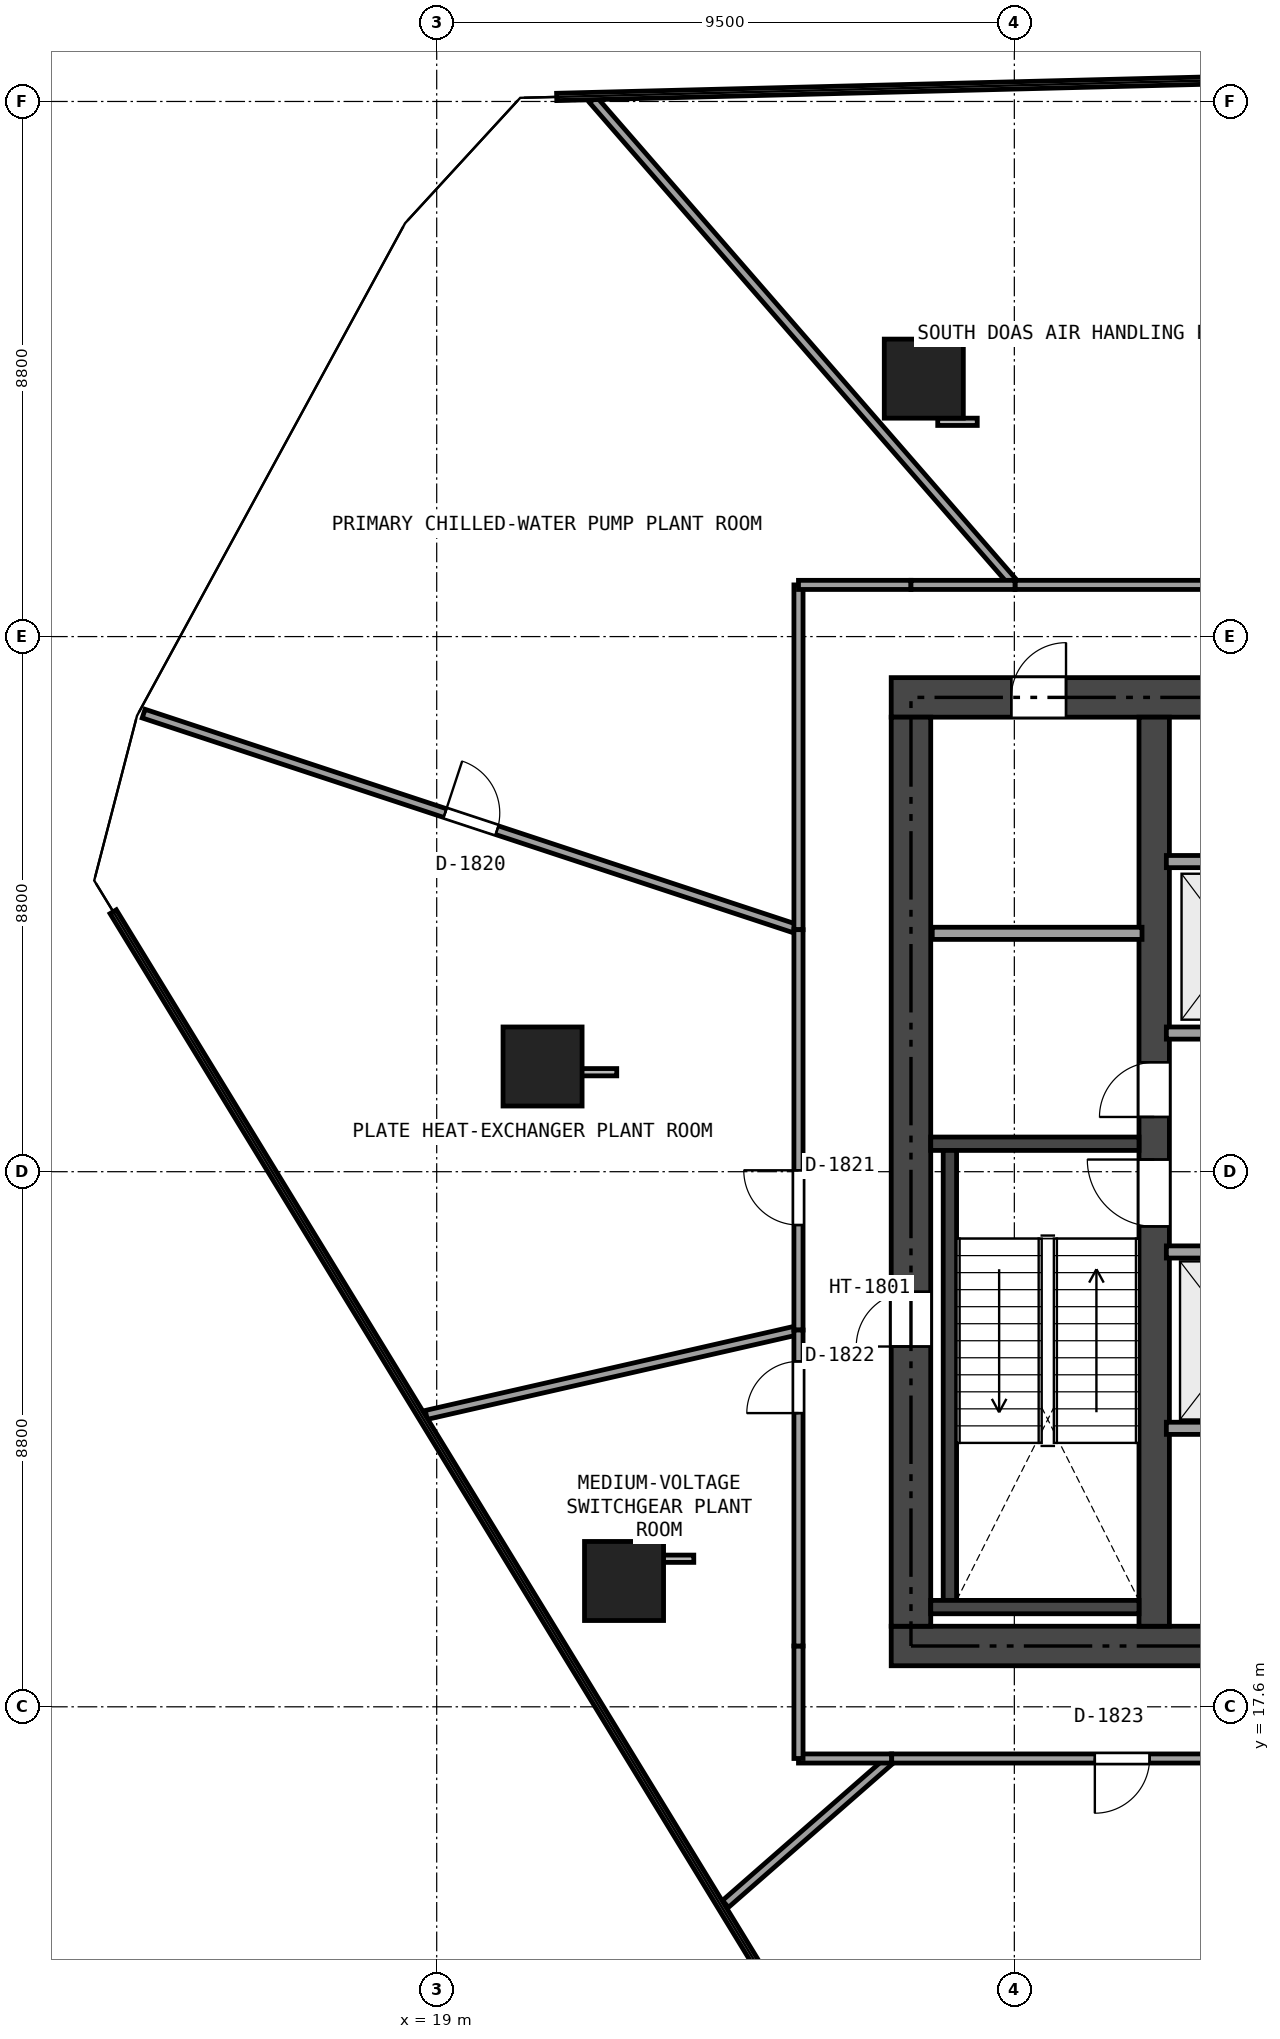
"""IFC4 building model, lengths in metres.
Left out: names, types, materials, properties, quantities, classifications, styles, units other than length and angle.
Written with IfcOpenShell. Run it as: python <this file> out.ifc"""

import sys

from ifc_helpers import new_model, si_unit, direction, frame, frame_2d, origin, origin_2d, place, context, subcontext, project, spatial, rectangle, extrude, element, fill, save


model = new_model("IFC4")
c1 = context("Model", 3, precision=1e-05, world=origin(), true_north=direction((0.0, 1.0)))
c2 = subcontext(c1, "Body", "Model", "MODEL_VIEW")
j1 = project(units=[si_unit("LENGTHUNIT", "METRE"), si_unit("PLANEANGLEUNIT", "RADIAN")], contexts=[c1])
p1 = place(None, origin())
s1 = spatial("IfcSite", under=j1, at=p1, CompositionType="ELEMENT")
p2 = place(p1, origin())
s2 = spatial("IfcBuilding", under=s1, at=p2, CompositionType="ELEMENT")
p3 = place(p2, frame((0.0, 0.0, 71.85)))
s3 = spatial("IfcBuildingStorey", under=s2, at=p3, CompositionType="ELEMENT", Elevation=71.85)
p4 = place(p3, frame((26.475, 18.6, 0.0), z_axis=(0.0, 0.0, 1.0), x_axis=(1.0, 0.0, 0.0)))
e1 = element("IfcWall", 1, at=p4, inside=s3, PredefinedType="SHEAR", context=c2, shape_type="SweptSolid", body=[
    extrude(rectangle(XDim=21.45, YDim=0.65, at=frame_2d((10.725, 0.0))), origin(), (0.0, 0.0, 1.0), 4.08),
])
p5 = place(p4, frame((12.45, 0.0, 0.0)))
e2 = element("IfcOpeningElement", 2, at=p5, cuts=e1, PredefinedType="OPENING", context=c2, shape_type="SweptSolid", body=[
    extrude(rectangle(XDim=1.15, YDim=2.15, at=frame_2d((0.575, 1.075))), frame((0.0, 0.335, 0.0), z_axis=(0.0, -1.0, 0.0), x_axis=(1.0, 0.0, 0.0)), (0.0, 0.0, 1.0), 0.67),
])
p6 = place(p4, frame((5.275, 0.0, 0.0)))
e3 = element("IfcOpeningElement", 3, at=p6, cuts=e1, PredefinedType="OPENING", context=c2, shape_type="SweptSolid", body=[
    extrude(rectangle(XDim=0.9, YDim=2.1, at=frame_2d((0.45, 1.05))), frame((0.0, 0.335, 0.0), z_axis=(0.0, -1.0, 0.0), x_axis=(1.0, 0.0, 0.0)), (0.0, 0.0, 1.0), 0.67),
])
p7 = place(p3, frame((26.475, 34.2, 0.0), z_axis=(0.0, 0.0, 1.0), x_axis=(1.0, 0.0, 0.0)))
e4 = element("IfcWall", 4, at=p7, inside=s3, PredefinedType="SHEAR", context=c2, shape_type="SweptSolid", body=[
    extrude(rectangle(XDim=21.45, YDim=0.65, at=frame_2d((10.725, 0.0))), origin(), (0.0, 0.0, 1.0), 4.08),
])
p8 = place(p7, frame((9.725, 0.0, 0.0)))
e5 = element("IfcOpeningElement", 5, at=p8, cuts=e4, PredefinedType="OPENING", context=c2, shape_type="SweptSolid", body=[
    extrude(rectangle(XDim=1.1, YDim=2.15, at=frame_2d((0.55, 1.075))), frame((0.0, 0.335, 0.0), z_axis=(0.0, -1.0, 0.0), x_axis=(1.0, 0.0, 0.0)), (0.0, 0.0, 1.0), 0.67),
])
p9 = place(p7, frame((1.975, 0.0, 0.0)))
e6 = element("IfcOpeningElement", 6, at=p9, cuts=e4, PredefinedType="OPENING", context=c2, shape_type="SweptSolid", body=[
    extrude(rectangle(XDim=0.9, YDim=2.1, at=frame_2d((0.45, 1.05))), frame((0.0, 0.335, 0.0), z_axis=(0.0, -1.0, 0.0), x_axis=(1.0, 0.0, 0.0)), (0.0, 0.0, 1.0), 0.67),
])
p10 = place(p7, frame((6.275, 0.0, 0.0)))
e7 = element("IfcOpeningElement", 7, at=p10, cuts=e4, PredefinedType="OPENING", context=c2, shape_type="SweptSolid", body=[
    extrude(rectangle(XDim=0.9, YDim=2.1, at=frame_2d((0.45, 1.05))), frame((0.0, 0.335, 0.0), z_axis=(0.0, -1.0, 0.0), x_axis=(1.0, 0.0, 0.0)), (0.0, 0.0, 1.0), 0.67),
])
p11 = place(p3, frame((26.8, 18.925, 0.0), z_axis=(0.0, 0.0, 1.0), x_axis=(0.0, 1.0, 0.0)))
e8 = element("IfcWall", 8, at=p11, inside=s3, PredefinedType="SHEAR", context=c2, shape_type="SweptSolid", body=[
    extrude(rectangle(XDim=14.95, YDim=0.65, at=frame_2d((7.475, 0.0))), origin(), (0.0, 0.0, 1.0), 4.08),
])
p12 = place(p11, frame((4.6, 0.0, 0.02)))
e9 = element("IfcOpeningElement", 9, at=p12, cuts=e8, PredefinedType="OPENING", context=c2, shape_type="SweptSolid", body=[
    extrude(rectangle(XDim=0.9, YDim=2.02, at=frame_2d((0.45, 1.01))), frame((0.0, 0.335, 0.0), z_axis=(0.0, -1.0, 0.0), x_axis=(1.0, 0.0, 0.0)), (0.0, 0.0, 1.0), 0.67),
])
p13 = place(p3, frame((30.8, 18.925, 0.0), z_axis=(0.0, 0.0, 1.0), x_axis=(0.0, 1.0, 0.0)))
e10 = element("IfcWall", 10, at=p13, inside=s3, PredefinedType="SHEAR", context=c2, shape_type="SweptSolid", body=[
    extrude(rectangle(XDim=14.95, YDim=0.5, at=frame_2d((7.475, 0.0))), origin(), (0.0, 0.0, 1.0), 4.08),
])
p14 = place(p13, frame((6.575, 0.0, 0.0)))
e11 = element("IfcOpeningElement", 11, at=p14, cuts=e10, PredefinedType="OPENING", context=c2, shape_type="SweptSolid", body=[
    extrude(rectangle(XDim=1.1, YDim=2.15, at=frame_2d((0.55, 1.075))), frame((0.0, 0.26, 0.0), z_axis=(0.0, -1.0, 0.0), x_axis=(1.0, 0.0, 0.0)), (0.0, 0.0, 1.0), 0.52),
])
p15 = place(p13, frame((8.375, 0.0, 0.0)))
e12 = element("IfcOpeningElement", 12, at=p15, cuts=e10, PredefinedType="OPENING", context=c2, shape_type="SweptSolid", body=[
    extrude(rectangle(XDim=0.9, YDim=2.1, at=frame_2d((0.45, 1.05))), frame((0.0, 0.26, 0.0), z_axis=(0.0, -1.0, 0.0), x_axis=(1.0, 0.0, 0.0)), (0.0, 0.0, 1.0), 0.52),
])
p16 = place(p3, frame((27.125, 26.86, 0.0), z_axis=(0.0, 0.0, 1.0), x_axis=(1.0, 0.0, 0.0)))
e13 = element("IfcWall", 13, at=p16, inside=s3, PredefinedType="SHEAR", context=c2, shape_type="SweptSolid", body=[
    extrude(rectangle(XDim=3.425, YDim=0.22, at=frame_2d((1.712, 0.0))), origin(), (0.0, 0.0, 1.0), 4.08),
])
p17 = place(p3, frame((27.44, 19.35, 0.0), z_axis=(0.0, 0.0, 1.0), x_axis=(0.0, 1.0, 0.0)))
e14 = element("IfcWall", 14, at=p17, inside=s3, PredefinedType="SHEAR", context=c2, shape_type="SweptSolid", body=[
    extrude(rectangle(XDim=7.4, YDim=0.22, at=frame_2d((3.7, 0.0))), origin(), (0.0, 0.0, 1.0), 4.08),
])
p18 = place(p3, frame((27.125, 19.24, 0.0), z_axis=(0.0, 0.0, 1.0), x_axis=(1.0, 0.0, 0.0)))
e15 = element("IfcWall", 15, at=p18, inside=s3, PredefinedType="SHEAR", context=c2, shape_type="SweptSolid", body=[
    extrude(rectangle(XDim=3.425, YDim=0.22, at=frame_2d((1.712, 0.0))), origin(), (0.0, 0.0, 1.0), 4.08),
])
for number, where, z_axis, x_axis in (
    (16, (27.011, 39.442, 0.0), (0.0, 0.0, 1.0), (1.0, 0.0, 0.0)),
    (17, (20.741, 28.13, 0.0), (0.0, 0.0, 1.0), (1.0, 0.0, 0.0)),
    (18, (22.081, 19.669, 0.0), (0.0, 0.0, 1.0), (1.0, 0.0, 0.0)),
):
    element("IfcColumn", number, at=place(p3, frame(where, z_axis=z_axis, x_axis=x_axis)), inside=s3, PredefinedType="COLUMN", context=c2, shape_type="SweptSolid", body=[
        extrude(rectangle(XDim=1.3, YDim=1.3, at=origin_2d()), origin(), (0.0, 0.0, 1.0), 4.08),
    ])
p19 = place(p3, frame((27.15, 30.32, 0.0), z_axis=(0.0, 0.0, 1.0), x_axis=(1.0, 0.0, 0.0)))
e19 = element("IfcWall", 19, at=p19, inside=s3, PredefinedType="SOLIDWALL", context=c2, shape_type="SweptSolid", body=[
    extrude(rectangle(XDim=3.45, YDim=0.2, at=frame_2d((1.725, 0.0))), origin(), (0.0, 0.0, 1.0), 4.08),
])
p20 = place(p3, frame((31.0, 28.68, 0.0), z_axis=(0.0, 0.0, 1.0), x_axis=(1.0, 0.0, 0.0)))
e20 = element("IfcWall", 20, at=p20, inside=s3, PredefinedType="SOLIDWALL", context=c2, shape_type="SweptSolid", body=[
    extrude(rectangle(XDim=4.42, YDim=0.2, at=frame_2d((2.21, 0.0))), origin(), (0.0, 0.0, 1.0), 4.08),
])
p21 = place(p20, frame((0.6, 0.0, 0.0)))
e21 = element("IfcOpeningElement", 21, at=p21, cuts=e20, PredefinedType="OPENING", context=c2, shape_type="SweptSolid", body=[
    extrude(rectangle(XDim=1.1, YDim=2.15, at=frame_2d((0.55, 1.075))), frame((0.0, 0.11, 0.0), z_axis=(0.0, -1.0, 0.0), x_axis=(1.0, 0.0, 0.0)), (0.0, 0.0, 1.0), 0.22),
])
p22 = place(p20, frame((2.85, 0.0, 0.0)))
e22 = element("IfcOpeningElement", 22, at=p22, cuts=e20, PredefinedType="OPENING", context=c2, shape_type="SweptSolid", body=[
    extrude(rectangle(XDim=1.1, YDim=2.15, at=frame_2d((0.55, 1.075))), frame((0.0, 0.11, 0.0), z_axis=(0.0, -1.0, 0.0), x_axis=(1.0, 0.0, 0.0)), (0.0, 0.0, 1.0), 0.22),
])
p23 = place(p3, frame((31.0, 31.5, 0.0), z_axis=(0.0, 0.0, 1.0), x_axis=(1.0, 0.0, 0.0)))
e23 = element("IfcWall", 23, at=p23, inside=s3, PredefinedType="SOLIDWALL", context=c2, shape_type="SweptSolid", body=[
    extrude(rectangle(XDim=4.42, YDim=0.2, at=frame_2d((2.21, 0.0))), origin(), (0.0, 0.0, 1.0), 4.08),
])
p24 = place(p3, frame((31.0, 25.08, 0.0), z_axis=(0.0, 0.0, 1.0), x_axis=(1.0, 0.0, 0.0)))
e24 = element("IfcWall", 24, at=p24, inside=s3, PredefinedType="SOLIDWALL", context=c2, shape_type="SweptSolid", body=[
    extrude(rectangle(XDim=4.42, YDim=0.2, at=frame_2d((2.21, 0.0))), origin(), (0.0, 0.0, 1.0), 4.08),
])
p25 = place(p24, frame((3.0, 0.0, 0.0)))
e25 = element("IfcOpeningElement", 25, at=p25, cuts=e24, PredefinedType="OPENING", context=c2, shape_type="SweptSolid", body=[
    extrude(rectangle(XDim=0.9, YDim=2.1, at=frame_2d((0.45, 1.05))), frame((0.0, 0.11, 0.0), z_axis=(0.0, -1.0, 0.0), x_axis=(1.0, 0.0, 0.0)), (0.0, 0.0, 1.0), 0.22),
])
p26 = place(p24, frame((0.62, 0.0, 0.0)))
e26 = element("IfcOpeningElement", 26, at=p26, cuts=e24, PredefinedType="OPENING", context=c2, shape_type="SweptSolid", body=[
    extrude(rectangle(XDim=1.2, YDim=2.15, at=frame_2d((0.6, 1.075))), frame((0.0, 0.11, 0.0), z_axis=(0.0, -1.0, 0.0), x_axis=(1.0, 0.0, 0.0)), (0.0, 0.0, 1.0), 0.22),
])
p27 = place(p3, frame((31.0, 22.18, 0.0), z_axis=(0.0, 0.0, 1.0), x_axis=(1.0, 0.0, 0.0)))
e27 = element("IfcWall", 27, at=p27, inside=s3, PredefinedType="SOLIDWALL", context=c2, shape_type="SweptSolid", body=[
    extrude(rectangle(XDim=2.42, YDim=0.2, at=frame_2d((1.21, 0.0))), origin(), (0.0, 0.0, 1.0), 4.08),
])
p28 = place(p3, frame((21.571, 44.029, 0.0), z_axis=(0.0, 0.0, 1.0), x_axis=(0.656269020125, -0.754526986412, 0.0)))
e28 = element("IfcWall", 28, at=p28, inside=s3, PredefinedType="PARTITIONING", context=c2, shape_type="SweptSolid", body=[
    extrude(rectangle(XDim=10.575, YDim=0.15, at=frame_2d((5.288, 0.0))), origin(), (0.0, 0.0, 1.0), 3.265),
])
p29 = place(p3, frame((28.511, 36.05, 0.0), z_axis=(0.0, 0.0, 1.0), x_axis=(1.0, 0.0, 0.0)))
e29 = element("IfcWall", 29, at=p29, inside=s3, PredefinedType="PARTITIONING", context=c2, shape_type="SweptSolid", body=[
    extrude(rectangle(XDim=6.638, YDim=0.15, at=frame_2d((3.319, 0.0))), origin(), (0.0, 0.0, 1.0), 3.065),
])
p30 = place(p29, frame((3.245, 0.0, 0.0)))
e30 = element("IfcOpeningElement", 30, at=p30, cuts=e29, PredefinedType="OPENING", context=c2, shape_type="SweptSolid", body=[
    extrude(rectangle(XDim=0.9, YDim=2.0, at=frame_2d((0.45, 1.0))), frame((0.0, 0.085, 0.0), z_axis=(0.0, -1.0, 0.0), x_axis=(1.0, 0.0, 0.0)), (0.0, 0.0, 1.0), 0.17),
])
p31 = place(p3, frame((14.18, 33.933, 0.0), z_axis=(0.0, 0.0, 1.0), x_axis=(0.949651837429, -0.313307177811, 0.0)))
e31 = element("IfcWall", 31, at=p31, inside=s3, PredefinedType="PARTITIONING", context=c2, shape_type="SweptSolid", body=[
    extrude(rectangle(XDim=11.341, YDim=0.15, at=frame_2d((5.67, 0.0))), origin(), (0.0, 0.0, 1.0), 3.265),
])
p32 = place(p31, frame((5.22, 0.0, 0.0)))
e32 = element("IfcOpeningElement", 32, at=p32, cuts=e31, PredefinedType="OPENING", context=c2, shape_type="SweptSolid", body=[
    extrude(rectangle(XDim=0.9, YDim=2.0, at=frame_2d((0.45, 1.0))), frame((0.0, 0.085, 0.0), z_axis=(0.0, -1.0, 0.0), x_axis=(1.0, 0.0, 0.0)), (0.0, 0.0, 1.0), 0.17),
])
p33 = place(p3, frame((24.95, 30.38, 0.0), z_axis=(0.0, 0.0, 1.0), x_axis=(0.0, 1.0, 0.0)))
e33 = element("IfcWall", 33, at=p33, inside=s3, PredefinedType="PARTITIONING", context=c2, shape_type="SweptSolid", body=[
    extrude(rectangle(XDim=5.67, YDim=0.15, at=frame_2d((2.835, 0.0))), origin(), (0.0, 0.0, 1.0), 3.265),
])
p34 = place(p3, frame((24.95, 36.05, 0.0), z_axis=(0.0, 0.0, 1.0), x_axis=(1.0, 0.0, 0.0)))
e34 = element("IfcWall", 34, at=p34, inside=s3, PredefinedType="PARTITIONING", context=c2, shape_type="SweptSolid", body=[
    extrude(rectangle(XDim=1.85, YDim=0.15, at=frame_2d((0.925, 0.0))), origin(), (0.0, 0.0, 1.0), 3.265),
])
p35 = place(p3, frame((26.8, 36.05, 0.0), z_axis=(0.0, 0.0, 1.0), x_axis=(1.0, 0.0, 0.0)))
e35 = element("IfcWall", 35, at=p35, inside=s3, PredefinedType="PARTITIONING", context=c2, shape_type="SweptSolid", body=[
    extrude(rectangle(XDim=1.711, YDim=0.15, at=frame_2d((0.855, 0.0))), origin(), (0.0, 0.0, 1.0), 4.08),
])
p36 = place(p3, frame((18.828, 22.4, 0.0), z_axis=(0.0, 0.0, 1.0), x_axis=(0.974973721183, 0.222320136295, 0.0)))
e36 = element("IfcWall", 36, at=p36, inside=s3, PredefinedType="PARTITIONING", context=c2, shape_type="SweptSolid", body=[
    extrude(rectangle(XDim=6.279, YDim=0.15, at=frame_2d((3.14, 0.0))), origin(), (0.0, 0.0, 1.0), 3.265),
])
p37 = place(p3, frame((24.95, 23.796, 0.0), z_axis=(0.0, 0.0, 1.0), x_axis=(0.0, 1.0, 0.0)))
e37 = element("IfcWall", 37, at=p37, inside=s3, PredefinedType="PARTITIONING", context=c2, shape_type="SweptSolid", body=[
    extrude(rectangle(XDim=6.584, YDim=0.15, at=frame_2d((3.292, 0.0))), origin(), (0.0, 0.0, 1.0), 3.065),
])
p38 = place(p37, frame((1.727, 0.0, 0.0)))
e38 = element("IfcOpeningElement", 38, at=p38, cuts=e37, PredefinedType="OPENING", context=c2, shape_type="SweptSolid", body=[
    extrude(rectangle(XDim=0.9, YDim=2.0, at=frame_2d((0.45, 1.0))), frame((0.0, 0.085, 0.0), z_axis=(0.0, -1.0, 0.0), x_axis=(1.0, 0.0, 0.0)), (0.0, 0.0, 1.0), 0.17),
])
p39 = place(p3, frame((23.749, 14.358, 0.0), z_axis=(0.0, 0.0, 1.0), x_axis=(0.752585021189, 0.658495091767, 0.0)))
e39 = element("IfcWall", 39, at=p39, inside=s3, PredefinedType="PARTITIONING", context=c2, shape_type="SweptSolid", body=[
    extrude(rectangle(XDim=3.633, YDim=0.15, at=frame_2d((1.816, 0.0))), origin(), (0.0, 0.0, 1.0), 3.265),
])
p40 = place(p3, frame((26.483, 16.75, 0.0), z_axis=(0.0, 0.0, 1.0), x_axis=(-1.0, 0.0, 0.0)))
e40 = element("IfcWall", 40, at=p40, inside=s3, PredefinedType="PARTITIONING", context=c2, shape_type="SweptSolid", body=[
    extrude(rectangle(XDim=1.533, YDim=0.15, at=frame_2d((0.767, 0.0))), origin(), (0.0, 0.0, 1.0), 3.265),
])
p41 = place(p3, frame((24.95, 16.75, 0.0), z_axis=(0.0, 0.0, 1.0), x_axis=(0.0, 1.0, 0.0)))
e41 = element("IfcWall", 41, at=p41, inside=s3, PredefinedType="PARTITIONING", context=c2, shape_type="SweptSolid", body=[
    extrude(rectangle(XDim=1.85, YDim=0.15, at=frame_2d((0.925, 0.0))), origin(), (0.0, 0.0, 1.0), 3.265),
])
p42 = place(p3, frame((24.95, 18.6, 0.0), z_axis=(0.0, 0.0, 1.0), x_axis=(0.0, 1.0, 0.0)))
e42 = element("IfcWall", 42, at=p42, inside=s3, PredefinedType="PARTITIONING", context=c2, shape_type="SweptSolid", body=[
    extrude(rectangle(XDim=5.196, YDim=0.15, at=frame_2d((2.598, 0.0))), origin(), (0.0, 0.0, 1.0), 3.065),
])
p43 = place(p42, frame((3.83, 0.0, 0.0)))
e43 = element("IfcOpeningElement", 43, at=p43, cuts=e42, PredefinedType="OPENING", context=c2, shape_type="SweptSolid", body=[
    extrude(rectangle(XDim=0.85, YDim=2.0, at=frame_2d((0.425, 1.0))), frame((0.0, 0.085, 0.0), z_axis=(0.0, -1.0, 0.0), x_axis=(1.0, 0.0, 0.0)), (0.0, 0.0, 1.0), 0.17),
])
p44 = place(p3, frame((29.845, 4.353, 0.0), z_axis=(0.0, 0.0, 1.0), x_axis=(0.322244958059, 0.946656319371, 0.0)))
e44 = element("IfcWall", 44, at=p44, inside=s3, PredefinedType="PARTITIONING", context=c2, shape_type="SweptSolid", body=[
    extrude(rectangle(XDim=13.095, YDim=0.15, at=frame_2d((6.548, 0.0))), origin(), (0.0, 0.0, 1.0), 3.065),
])
p45 = place(p3, frame((34.065, 16.75, 0.0), z_axis=(0.0, 0.0, 1.0), x_axis=(-1.0, 0.0, 0.0)))
e45 = element("IfcWall", 45, at=p45, inside=s3, PredefinedType="PARTITIONING", context=c2, shape_type="SweptSolid", body=[
    extrude(rectangle(XDim=7.582, YDim=0.15, at=frame_2d((3.791, 0.0))), origin(), (0.0, 0.0, 1.0), 3.065),
])
p46 = place(p45, frame((3.341, 0.0, 0.0)))
e46 = element("IfcOpeningElement", 46, at=p46, cuts=e45, PredefinedType="OPENING", context=c2, shape_type="SweptSolid", body=[
    extrude(rectangle(XDim=0.9, YDim=2.0, at=frame_2d((0.45, 1.0))), frame((0.0, 0.085, 0.0), z_axis=(0.0, -1.0, 0.0), x_axis=(1.0, 0.0, 0.0)), (0.0, 0.0, 1.0), 0.17),
])
p47 = place(p12, origin())
e47 = element("IfcDoor", 47, at=p47, inside=s3, OperationType="SINGLE_SWING_LEFT", PredefinedType="TRAPDOOR", context=c2, shape_type="SweptSolid", body=[
    extrude(rectangle(XDim=0.9, YDim=2.02, at=frame_2d((0.45, 1.01))), frame((0.0, 0.025, 0.0), z_axis=(0.0, -1.0, 0.0), x_axis=(1.0, 0.0, 0.0)), (0.0, 0.0, 1.0), 0.05),
])
fill(e9, e47)
p48 = place(p14, origin())
e48 = element("IfcDoor", 48, at=p48, inside=s3, OperationType="SINGLE_SWING_RIGHT", PredefinedType="DOOR", context=c2, shape_type="SweptSolid", body=[
    extrude(rectangle(XDim=1.1, YDim=2.15, at=frame_2d((0.55, 1.075))), frame((0.0, 0.025, 0.0), z_axis=(0.0, -1.0, 0.0), x_axis=(1.0, 0.0, 0.0)), (0.0, 0.0, 1.0), 0.05),
])
fill(e11, e48)
p49 = place(p15, origin())
e49 = element("IfcDoor", 49, at=p49, inside=s3, OperationType="SINGLE_SWING_LEFT", PredefinedType="DOOR", context=c2, shape_type="SweptSolid", body=[
    extrude(rectangle(XDim=0.9, YDim=2.1, at=frame_2d((0.45, 1.05))), frame((0.0, 0.025, 0.0), z_axis=(0.0, -1.0, 0.0), x_axis=(1.0, 0.0, 0.0)), (0.0, 0.0, 1.0), 0.05),
])
fill(e12, e49)
p50 = place(p9, origin())
e50 = element("IfcDoor", 50, at=p50, inside=s3, OperationType="SINGLE_SWING_RIGHT", PredefinedType="DOOR", context=c2, shape_type="SweptSolid", body=[
    extrude(rectangle(XDim=0.9, YDim=2.1, at=frame_2d((0.45, 1.05))), frame((0.0, 0.025, 0.0), z_axis=(0.0, -1.0, 0.0), x_axis=(1.0, 0.0, 0.0)), (0.0, 0.0, 1.0), 0.05),
])
fill(e6, e50)
p51 = place(p32, origin())
e51 = element("IfcDoor", 51, at=p51, inside=s3, OperationType="SINGLE_SWING_LEFT", PredefinedType="DOOR", context=c2, shape_type="SweptSolid", body=[
    extrude(rectangle(XDim=0.9, YDim=2.0, at=frame_2d((0.45, 1.0))), frame((0.0, 0.025, 0.0), z_axis=(0.0, -1.0, 0.0), x_axis=(1.0, 0.0, 0.0)), (0.0, 0.0, 1.0), 0.05),
])
fill(e32, e51)
p52 = place(p38, origin())
e52 = element("IfcDoor", 52, at=p52, inside=s3, OperationType="SINGLE_SWING_RIGHT", PredefinedType="DOOR", context=c2, shape_type="SweptSolid", body=[
    extrude(rectangle(XDim=0.9, YDim=2.0, at=frame_2d((0.45, 1.0))), frame((0.0, 0.025, 0.0), z_axis=(0.0, -1.0, 0.0), x_axis=(1.0, 0.0, 0.0)), (0.0, 0.0, 1.0), 0.05),
])
fill(e38, e52)
p53 = place(p43, origin())
e53 = element("IfcDoor", 53, at=p53, inside=s3, OperationType="SINGLE_SWING_LEFT", PredefinedType="DOOR", context=c2, shape_type="SweptSolid", body=[
    extrude(rectangle(XDim=0.85, YDim=2.0, at=frame_2d((0.425, 1.0))), frame((0.0, 0.025, 0.0), z_axis=(0.0, -1.0, 0.0), x_axis=(1.0, 0.0, 0.0)), (0.0, 0.0, 1.0), 0.05),
])
fill(e43, e53)
p54 = place(p46, origin())
e54 = element("IfcDoor", 54, at=p54, inside=s3, OperationType="SINGLE_SWING_RIGHT", PredefinedType="DOOR", context=c2, shape_type="SweptSolid", body=[
    extrude(rectangle(XDim=0.9, YDim=2.0, at=frame_2d((0.45, 1.0))), frame((0.0, 0.025, 0.0), z_axis=(0.0, -1.0, 0.0), x_axis=(1.0, 0.0, 0.0)), (0.0, 0.0, 1.0), 0.05),
])
fill(e46, e54)
save(model, sys.argv[1])
